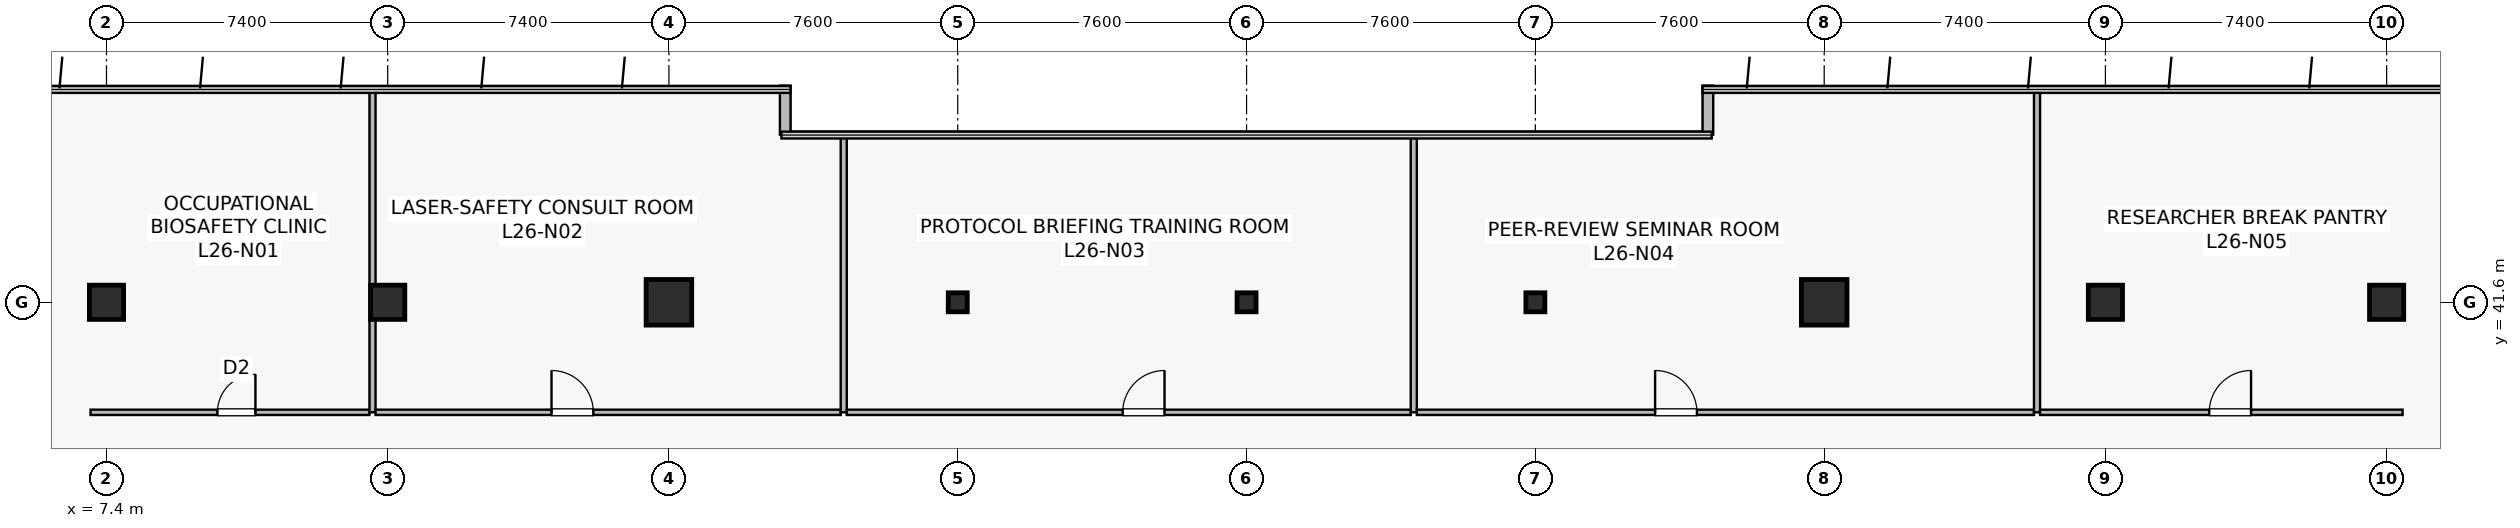
"""IFC4 building model, lengths in metres.
Left out: names, types, materials, properties, quantities, classifications, styles, units other than length and angle.
Written with IfcOpenShell. Run it as: python <this file> out.ifc"""

import sys

from ifc_helpers import new_model, si_unit, direction, frame, frame_2d, origin, origin_2d, place, context, subcontext, project, spatial, rectangle, hollow_rectangle, extrude, source, transform, mapped, element, fill, save


model = new_model("IFC4")
c1 = context("Model", 3, precision=1e-05, world=origin(), true_north=direction((0.0, 1.0)))
c2 = subcontext(c1, "Body", "Model", "MODEL_VIEW")
j1 = project(units=[si_unit("LENGTHUNIT", "METRE"), si_unit("PLANEANGLEUNIT", "RADIAN")], contexts=[c1])
p1 = place(None, origin())
s1 = spatial("IfcSite", under=j1, at=p1, CompositionType="ELEMENT")
p2 = place(p1, origin())
s2 = spatial("IfcBuilding", under=s1, at=p2, CompositionType="ELEMENT")
p3 = place(p2, frame((0.0, 0.0, 109.2)))
s3 = spatial("IfcBuildingStorey", under=s2, at=p3, CompositionType="ELEMENT", Elevation=109.2)
m1 = source(origin(), c2, "Body", "SweptSolid", [
    extrude(rectangle(XDim=0.9, YDim=0.9, at=origin_2d()), origin(), (0.0, 0.0, 1.0), 4.1),
])
p4 = place(p3, frame((14.8, 41.6, 0.0), z_axis=(0.0, 0.0, 1.0), x_axis=(1.0, 0.0, 0.0)))
e1 = element("IfcColumn", 1, at=p4, inside=s3, PredefinedType="COLUMN", context=c2, shape_type="MappedRepresentation", body=[
    mapped(m1, transform((0.0, 0.0, 0.0), scale=1.0)),
])
m2 = source(origin(), c2, "Body", "SweptSolid", [
    extrude(rectangle(XDim=1.2, YDim=1.2, at=origin_2d()), origin(), (0.0, 0.0, 1.0), 4.1),
])
for number, where, z_axis, x_axis in (
    (2, (22.2, 41.6, 0.0), (0.0, 0.0, 1.0), (1.0, 0.0, 0.0)),
    (3, (52.6, 41.6, 0.0), (0.0, 0.0, 1.0), (1.0, 0.0, 0.0)),
):
    element("IfcColumn", number, at=place(p3, frame(where, z_axis=z_axis, x_axis=x_axis)), inside=s3, PredefinedType="COLUMN", context=c2, shape_type="MappedRepresentation", body=[
        mapped(m2, transform((0.0, 0.0, 0.0), scale=1.0)),
    ])
for number, where, z_axis, x_axis in (
    (4, (60.0, 41.6, 0.0), (0.0, 0.0, 1.0), (1.0, 0.0, 0.0)),
    (5, (7.4, 41.6, 0.0), (0.0, 0.0, 1.0), (1.0, 0.0, 0.0)),
    (6, (67.4, 41.6, 0.0), (0.0, 0.0, 1.0), (1.0, 0.0, 0.0)),
):
    element("IfcColumn", number, at=place(p3, frame(where, z_axis=z_axis, x_axis=x_axis)), inside=s3, PredefinedType="COLUMN", context=c2, shape_type="MappedRepresentation", body=[
        mapped(m1, transform((0.0, 0.0, 0.0), scale=1.0)),
    ])
m3 = source(origin(), c2, "Body", "SweptSolid", [
    extrude(hollow_rectangle(XDim=0.5, YDim=0.5, WallThickness=0.022, at=origin_2d()), origin(), (0.0, 0.0, 1.0), 4.1),
])
for number, where, z_axis, x_axis in (
    (7, (29.8, 41.6, 0.0), (0.0, 0.0, 1.0), (1.0, 0.0, 0.0)),
    (8, (37.4, 41.6, 0.0), (0.0, 0.0, 1.0), (1.0, 0.0, 0.0)),
    (9, (45.0, 41.6, 0.0), (0.0, 0.0, 1.0), (1.0, 0.0, 0.0)),
):
    element("IfcColumn", number, at=place(p3, frame(where, z_axis=z_axis, x_axis=x_axis)), inside=s3, PredefinedType="COLUMN", context=c2, shape_type="MappedRepresentation", body=[
        mapped(m3, transform((0.0, 0.0, 0.0), scale=1.0)),
    ])
for number, where, z_axis, x_axis in (
    (10, (49.54, 47.3, 0.0), (0.0, 0.0, 1.0), (0.0, -1.0, 0.0)),
    (11, (25.26, 46.012, 0.0), (0.0, 0.0, 1.0), (0.0, 1.0, 0.0)),
):
    element("IfcWall", number, at=place(p3, frame(where, z_axis=z_axis, x_axis=x_axis)), inside=s3, PredefinedType="STANDARD", context=c2, shape_type="SweptSolid", body=[
        extrude(rectangle(XDim=1.288, YDim=0.28, at=frame_2d((0.644, 0.0))), origin(), (0.0, 0.0, 1.0), 3.79),
    ])
p5 = place(p3, frame((6.98, 38.705, 0.0), z_axis=(0.0, 0.0, 1.0), x_axis=(1.0, 0.0, 0.0)))
e12 = element("IfcWall", 12, at=p5, inside=s3, PredefinedType="PARTITIONING", context=c2, shape_type="SweptSolid", body=[
    extrude(rectangle(XDim=7.34, YDim=0.14, at=frame_2d((3.67, 0.0))), origin(), (0.0, 0.0, 1.0), 3.275),
])
p6 = place(p5, frame((3.339, 0.0, 0.0)))
e13 = element("IfcOpeningElement", 13, at=p6, cuts=e12, PredefinedType="OPENING", context=c2, shape_type="SweptSolid", body=[
    extrude(rectangle(XDim=1.0, YDim=2.15, at=frame_2d((0.5, 1.075))), frame((0.0, 0.08, 0.0), z_axis=(0.0, -1.0, 0.0), x_axis=(1.0, 0.0, 0.0)), (0.0, 0.0, 1.0), 0.16),
])
p7 = place(p3, frame((14.4, 38.705, 0.0), z_axis=(0.0, 0.0, 1.0), x_axis=(0.0, 1.0, 0.0)))
e14 = element("IfcWall", 14, at=p7, inside=s3, PredefinedType="PARTITIONING", context=c2, shape_type="SweptSolid", body=[
    extrude(rectangle(XDim=8.485, YDim=0.16, at=frame_2d((4.242, 0.0))), origin(), (0.0, 0.0, 1.0), 3.075),
])
p8 = place(p3, frame((14.48, 38.705, 0.0), z_axis=(0.0, 0.0, 1.0), x_axis=(1.0, 0.0, 0.0)))
e15 = element("IfcWall", 15, at=p8, inside=s3, PredefinedType="PARTITIONING", context=c2, shape_type="SweptSolid", body=[
    extrude(rectangle(XDim=12.24, YDim=0.14, at=frame_2d((6.12, 0.0))), origin(), (0.0, 0.0, 1.0), 3.125),
])
p9 = place(p8, frame((4.63, 0.0, 0.0)))
e16 = element("IfcOpeningElement", 16, at=p9, cuts=e15, PredefinedType="OPENING", context=c2, shape_type="SweptSolid", body=[
    extrude(rectangle(XDim=1.1, YDim=2.18, at=frame_2d((0.55, 1.09))), frame((0.0, 0.08, 0.0), z_axis=(0.0, -1.0, 0.0), x_axis=(1.0, 0.0, 0.0)), (0.0, 0.0, 1.0), 0.16),
])
p10 = place(p3, frame((26.8, 38.705, 0.0), z_axis=(0.0, 0.0, 1.0), x_axis=(0.0, 1.0, 0.0)))
e17 = element("IfcWall", 17, at=p10, inside=s3, PredefinedType="PARTITIONING", context=c2, shape_type="SweptSolid", body=[
    extrude(rectangle(XDim=7.285, YDim=0.16, at=frame_2d((3.643, 0.0))), origin(), (0.0, 0.0, 1.0), 3.075),
])
p11 = place(p3, frame((26.88, 38.705, 0.0), z_axis=(0.0, 0.0, 1.0), x_axis=(1.0, 0.0, 0.0)))
e18 = element("IfcWall", 18, at=p11, inside=s3, PredefinedType="PARTITIONING", context=c2, shape_type="SweptSolid", body=[
    extrude(rectangle(XDim=14.84, YDim=0.14, at=frame_2d((7.42, 0.0))), origin(), (0.0, 0.0, 1.0), 3.125),
])
p12 = place(p11, frame((7.261, 0.0, 0.0)))
e19 = element("IfcOpeningElement", 19, at=p12, cuts=e18, PredefinedType="OPENING", context=c2, shape_type="SweptSolid", body=[
    extrude(rectangle(XDim=1.1, YDim=2.18, at=frame_2d((0.55, 1.09))), frame((0.0, 0.08, 0.0), z_axis=(0.0, -1.0, 0.0), x_axis=(1.0, 0.0, 0.0)), (0.0, 0.0, 1.0), 0.16),
])
p13 = place(p3, frame((41.8, 38.705, 0.0), z_axis=(0.0, 0.0, 1.0), x_axis=(0.0, 1.0, 0.0)))
e20 = element("IfcWall", 20, at=p13, inside=s3, PredefinedType="PARTITIONING", context=c2, shape_type="SweptSolid", body=[
    extrude(rectangle(XDim=7.285, YDim=0.16, at=frame_2d((3.643, 0.0))), origin(), (0.0, 0.0, 1.0), 3.075),
])
p14 = place(p3, frame((41.88, 38.705, 0.0), z_axis=(0.0, 0.0, 1.0), x_axis=(1.0, 0.0, 0.0)))
e21 = element("IfcWall", 21, at=p14, inside=s3, PredefinedType="PARTITIONING", context=c2, shape_type="SweptSolid", body=[
    extrude(rectangle(XDim=16.24, YDim=0.14, at=frame_2d((8.12, 0.0))), origin(), (0.0, 0.0, 1.0), 3.125),
])
p15 = place(p14, frame((6.271, 0.0, 0.0)))
e22 = element("IfcOpeningElement", 22, at=p15, cuts=e21, PredefinedType="OPENING", context=c2, shape_type="SweptSolid", body=[
    extrude(rectangle(XDim=1.1, YDim=2.18, at=frame_2d((0.55, 1.09))), frame((0.0, 0.08, 0.0), z_axis=(0.0, -1.0, 0.0), x_axis=(1.0, 0.0, 0.0)), (0.0, 0.0, 1.0), 0.16),
])
p16 = place(p3, frame((58.2, 38.705, 0.0), z_axis=(0.0, 0.0, 1.0), x_axis=(0.0, 1.0, 0.0)))
e23 = element("IfcWall", 23, at=p16, inside=s3, PredefinedType="PARTITIONING", context=c2, shape_type="SweptSolid", body=[
    extrude(rectangle(XDim=8.485, YDim=0.16, at=frame_2d((4.242, 0.0))), origin(), (0.0, 0.0, 1.0), 3.075),
])
p17 = place(p3, frame((58.28, 38.705, 0.0), z_axis=(0.0, 0.0, 1.0), x_axis=(1.0, 0.0, 0.0)))
e24 = element("IfcWall", 24, at=p17, inside=s3, PredefinedType="PARTITIONING", context=c2, shape_type="SweptSolid", body=[
    extrude(rectangle(XDim=9.54, YDim=0.14, at=frame_2d((4.77, 0.0))), origin(), (0.0, 0.0, 1.0), 3.125),
])
p18 = place(p17, frame((4.452, 0.0, 0.0)))
e25 = element("IfcOpeningElement", 25, at=p18, cuts=e24, PredefinedType="OPENING", context=c2, shape_type="SweptSolid", body=[
    extrude(rectangle(XDim=1.1, YDim=2.18, at=frame_2d((0.55, 1.09))), frame((0.0, 0.08, 0.0), z_axis=(0.0, -1.0, 0.0), x_axis=(1.0, 0.0, 0.0)), (0.0, 0.0, 1.0), 0.16),
])
m4 = source(origin(), c2, "Body", "SweptSolid", [
    extrude(rectangle(XDim=1.0, YDim=2.15, at=frame_2d((0.5, 1.075))), frame((0.0, 0.025, 0.0), z_axis=(0.0, -1.0, 0.0), x_axis=(1.0, 0.0, 0.0)), (0.0, 0.0, 1.0), 0.05),
])
p19 = place(p6, origin())
e26 = element("IfcDoor", 26, at=p19, inside=s3, OperationType="SINGLE_SWING_RIGHT", PredefinedType="DOOR", context=c2, shape_type="MappedRepresentation", body=[
    mapped(m4, transform((0.0, 0.0, 0.0), scale=1.0)),
])
fill(e13, e26)
m5 = source(origin(), c2, "Body", "SweptSolid", [
    extrude(rectangle(XDim=1.1, YDim=2.18, at=frame_2d((0.55, 1.09))), frame((0.0, 0.025, 0.0), z_axis=(0.0, -1.0, 0.0), x_axis=(1.0, 0.0, 0.0)), (0.0, 0.0, 1.0), 0.05),
])
p20 = place(p9, origin())
e27 = element("IfcDoor", 27, at=p20, inside=s3, OperationType="SINGLE_SWING_LEFT", PredefinedType="DOOR", context=c2, shape_type="MappedRepresentation", body=[
    mapped(m5, transform((0.0, 0.0, 0.0), scale=1.0)),
])
fill(e16, e27)
p21 = place(p12, origin())
e28 = element("IfcDoor", 28, at=p21, inside=s3, OperationType="SINGLE_SWING_RIGHT", PredefinedType="DOOR", context=c2, shape_type="MappedRepresentation", body=[
    mapped(m5, transform((0.0, 0.0, 0.0), scale=1.0)),
])
fill(e19, e28)
p22 = place(p15, origin())
e29 = element("IfcDoor", 29, at=p22, inside=s3, OperationType="SINGLE_SWING_LEFT", PredefinedType="DOOR", context=c2, shape_type="MappedRepresentation", body=[
    mapped(m5, transform((0.0, 0.0, 0.0), scale=1.0)),
])
fill(e22, e29)
p23 = place(p18, origin())
e30 = element("IfcDoor", 30, at=p23, inside=s3, OperationType="SINGLE_SWING_RIGHT", PredefinedType="DOOR", context=c2, shape_type="MappedRepresentation", body=[
    mapped(m5, transform((0.0, 0.0, 0.0), scale=1.0)),
])
fill(e25, e30)
save(model, sys.argv[1])
